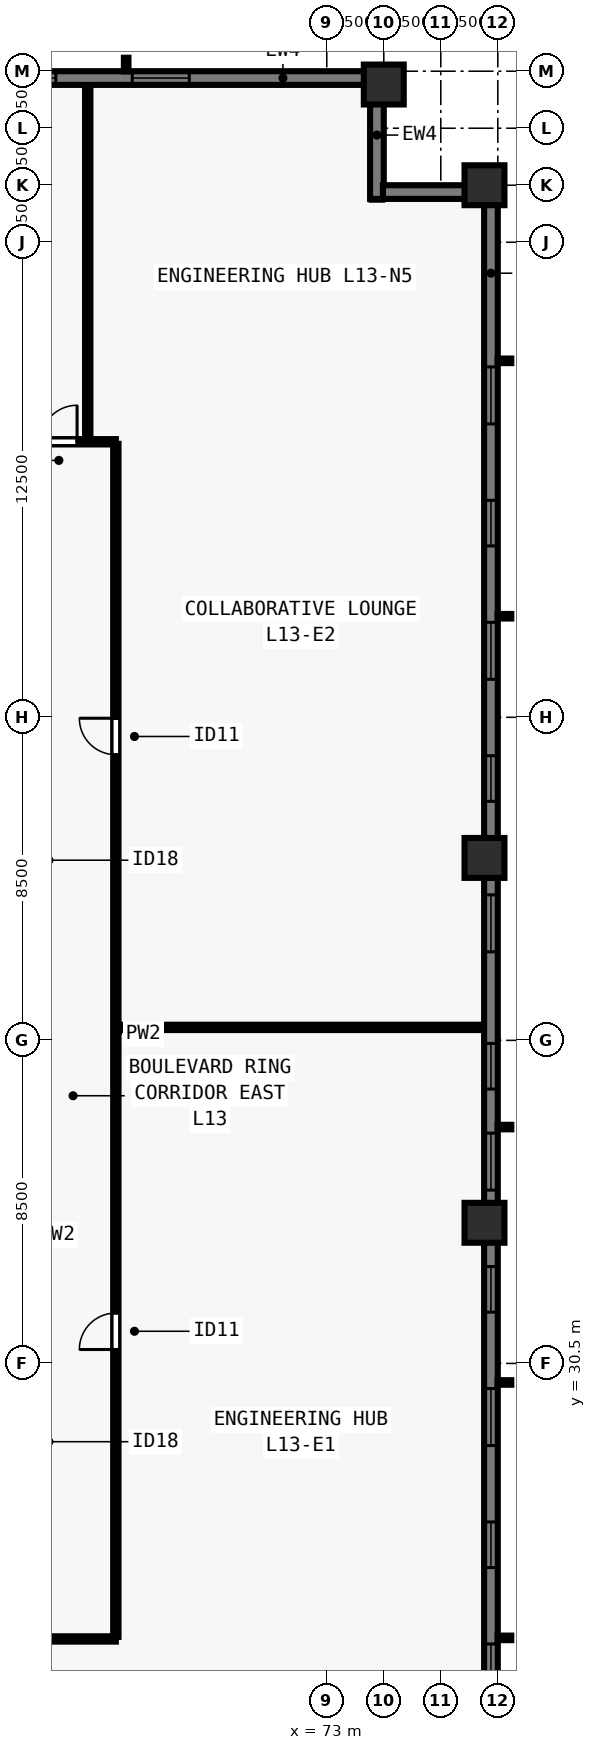
"""IFC4 building model, lengths in metres.
Left out: names, types, materials, properties, quantities, classifications, styles, units other than length and angle.
Written with IfcOpenShell. Run it as: python <this file> out.ifc"""

import sys

from ifc_helpers import new_model, si_unit, direction, frame, frame_2d, origin, origin_2d, place, context, subcontext, project, spatial, rectangle, extrude, element, fill, save


model = new_model("IFC4")
c1 = context("Model", 3, precision=1e-05, world=origin(), true_north=direction((0.0, 1.0)))
c2 = subcontext(c1, "Body", "Model", "MODEL_VIEW")
j1 = project(units=[si_unit("LENGTHUNIT", "METRE"), si_unit("PLANEANGLEUNIT", "RADIAN")], contexts=[c1])
p1 = place(None, origin())
s1 = spatial("IfcSite", under=j1, at=p1, CompositionType="ELEMENT")
p2 = place(p1, origin())
s2 = spatial("IfcBuilding", under=s1, at=p2, CompositionType="ELEMENT")
p3 = place(p2, frame((0.0, 0.0, 51.5)))
s3 = spatial("IfcBuildingStorey", under=s2, at=p3, CompositionType="ELEMENT", Elevation=51.5)
for number, where, z_axis, x_axis in (
    (1, (77.15, 34.2, 0.0), (0.0, 0.0, 1.0), (0.0, 1.0, 0.0)),
    (2, (77.15, 43.8, 0.0), (0.0, 0.0, 1.0), (0.0, 1.0, 0.0)),
    (3, (77.15, 61.5, 0.0), (0.0, 0.0, 1.0), (0.0, 1.0, 0.0)),
    (4, (74.5, 64.15, 0.0), (0.0, 0.0, 1.0), (1.0, 0.0, 0.0)),
):
    element("IfcColumn", number, at=place(p3, frame(where, z_axis=z_axis, x_axis=x_axis)), inside=s3, PredefinedType="COLUMN", context=c2, shape_type="SweptSolid", body=[
        extrude(rectangle(XDim=1.05, YDim=1.05, at=origin_2d()), origin(), (0.0, 0.0, 1.0), 3.5),
    ])
p4 = place(p3, frame((29.5, 64.32, 0.0), z_axis=(0.0, 0.0, 1.0), x_axis=(1.0, 0.0, 0.0)))
e5 = element("IfcWall", 5, at=p4, inside=s3, PredefinedType="SOLIDWALL", context=c2, shape_type="SweptSolid", body=[
    extrude(rectangle(XDim=44.662, YDim=0.36, at=frame_2d((22.331, 0.0))), origin(), (0.0, 0.0, 1.0), 3.28),
])
p5 = place(p4, frame((4.78, 0.0, 0.8)))
e6 = element("IfcOpeningElement", 6, at=p5, cuts=e5, PredefinedType="OPENING", context=c2, shape_type="SweptSolid", body=[
    extrude(rectangle(XDim=1.5, YDim=1.544, at=frame_2d((0.75, 0.772))), frame((0.0, 0.19, 0.0), z_axis=(0.0, -1.0, 0.0), x_axis=(1.0, 0.0, 0.0)), (0.0, 0.0, 1.0), 0.38),
])
p6 = place(p4, frame((8.29, 0.0, 0.8)))
e7 = element("IfcOpeningElement", 7, at=p6, cuts=e5, PredefinedType="OPENING", context=c2, shape_type="SweptSolid", body=[
    extrude(rectangle(XDim=1.2, YDim=1.544, at=frame_2d((0.6, 0.772))), frame((0.0, 0.19, 0.0), z_axis=(0.0, -1.0, 0.0), x_axis=(1.0, 0.0, 0.0)), (0.0, 0.0, 1.0), 0.38),
])
p7 = place(p4, frame((11.5, 0.0, 0.8)))
e8 = element("IfcOpeningElement", 8, at=p7, cuts=e5, PredefinedType="OPENING", context=c2, shape_type="SweptSolid", body=[
    extrude(rectangle(XDim=1.5, YDim=1.544, at=frame_2d((0.75, 0.772))), frame((0.0, 0.19, 0.0), z_axis=(0.0, -1.0, 0.0), x_axis=(1.0, 0.0, 0.0)), (0.0, 0.0, 1.0), 0.38),
])
p8 = place(p4, frame((15.01, 0.0, 0.8)))
e9 = element("IfcOpeningElement", 9, at=p8, cuts=e5, PredefinedType="OPENING", context=c2, shape_type="SweptSolid", body=[
    extrude(rectangle(XDim=1.2, YDim=1.544, at=frame_2d((0.6, 0.772))), frame((0.0, 0.19, 0.0), z_axis=(0.0, -1.0, 0.0), x_axis=(1.0, 0.0, 0.0)), (0.0, 0.0, 1.0), 0.38),
])
p9 = place(p4, frame((18.671, 0.0, 0.8)))
e10 = element("IfcOpeningElement", 10, at=p9, cuts=e5, PredefinedType="OPENING", context=c2, shape_type="SweptSolid", body=[
    extrude(rectangle(XDim=1.5, YDim=1.544, at=frame_2d((0.75, 0.772))), frame((0.0, 0.19, 0.0), z_axis=(0.0, -1.0, 0.0), x_axis=(1.0, 0.0, 0.0)), (0.0, 0.0, 1.0), 0.38),
])
p10 = place(p4, frame((21.731, 0.0, 0.8)))
e11 = element("IfcOpeningElement", 11, at=p10, cuts=e5, PredefinedType="OPENING", context=c2, shape_type="SweptSolid", body=[
    extrude(rectangle(XDim=1.2, YDim=1.544, at=frame_2d((0.6, 0.772))), frame((0.0, 0.19, 0.0), z_axis=(0.0, -1.0, 0.0), x_axis=(1.0, 0.0, 0.0)), (0.0, 0.0, 1.0), 0.38),
])
p11 = place(p4, frame((24.941, 0.0, 0.8)))
e12 = element("IfcOpeningElement", 12, at=p11, cuts=e5, PredefinedType="OPENING", context=c2, shape_type="SweptSolid", body=[
    extrude(rectangle(XDim=1.5, YDim=1.544, at=frame_2d((0.75, 0.772))), frame((0.0, 0.19, 0.0), z_axis=(0.0, -1.0, 0.0), x_axis=(1.0, 0.0, 0.0)), (0.0, 0.0, 1.0), 0.38),
])
p12 = place(p4, frame((28.451, 0.0, 0.8)))
e13 = element("IfcOpeningElement", 13, at=p12, cuts=e5, PredefinedType="OPENING", context=c2, shape_type="SweptSolid", body=[
    extrude(rectangle(XDim=1.2, YDim=1.544, at=frame_2d((0.6, 0.772))), frame((0.0, 0.19, 0.0), z_axis=(0.0, -1.0, 0.0), x_axis=(1.0, 0.0, 0.0)), (0.0, 0.0, 1.0), 0.38),
])
p13 = place(p4, frame((31.662, 0.0, 0.8)))
e14 = element("IfcOpeningElement", 14, at=p13, cuts=e5, PredefinedType="OPENING", context=c2, shape_type="SweptSolid", body=[
    extrude(rectangle(XDim=1.5, YDim=1.544, at=frame_2d((0.75, 0.772))), frame((0.0, 0.19, 0.0), z_axis=(0.0, -1.0, 0.0), x_axis=(1.0, 0.0, 0.0)), (0.0, 0.0, 1.0), 0.38),
])
p14 = place(p4, frame((35.172, 0.0, 0.8)))
e15 = element("IfcOpeningElement", 15, at=p14, cuts=e5, PredefinedType="OPENING", context=c2, shape_type="SweptSolid", body=[
    extrude(rectangle(XDim=1.2, YDim=1.544, at=frame_2d((0.6, 0.772))), frame((0.0, 0.19, 0.0), z_axis=(0.0, -1.0, 0.0), x_axis=(1.0, 0.0, 0.0)), (0.0, 0.0, 1.0), 0.38),
])
p15 = place(p4, frame((38.382, 0.0, 0.8)))
e16 = element("IfcOpeningElement", 16, at=p15, cuts=e5, PredefinedType="OPENING", context=c2, shape_type="SweptSolid", body=[
    extrude(rectangle(XDim=1.5, YDim=1.544, at=frame_2d((0.75, 0.772))), frame((0.0, 0.19, 0.0), z_axis=(0.0, -1.0, 0.0), x_axis=(1.0, 0.0, 0.0)), (0.0, 0.0, 1.0), 0.38),
])
p16 = place(p3, frame((74.32, 64.5, 0.0), z_axis=(0.0, 0.0, 1.0), x_axis=(0.0, -1.0, 0.0)))
e17 = element("IfcWall", 17, at=p16, inside=s3, PredefinedType="SOLIDWALL", context=c2, shape_type="SweptSolid", body=[
    extrude(rectangle(XDim=3.36, YDim=0.36, at=frame_2d((1.68, 0.0))), origin(), (0.0, 0.0, 1.0), 3.28),
])
p17 = place(p3, frame((74.478, 61.32, 0.0), z_axis=(0.0, 0.0, 1.0), x_axis=(1.0, 0.0, 0.0)))
e18 = element("IfcWall", 18, at=p17, inside=s3, PredefinedType="SOLIDWALL", context=c2, shape_type="SweptSolid", body=[
    extrude(rectangle(XDim=2.684, YDim=0.36, at=frame_2d((1.342, 0.0))), origin(), (0.0, 0.0, 1.0), 3.28),
])
p18 = place(p3, frame((77.32, 61.5, 0.0), z_axis=(0.0, 0.0, 1.0), x_axis=(0.0, -1.0, 0.0)))
e19 = element("IfcWall", 19, at=p18, inside=s3, PredefinedType="SOLIDWALL", context=c2, shape_type="SweptSolid", body=[
    extrude(rectangle(XDim=44.662, YDim=0.36, at=frame_2d((22.331, 0.0))), origin(), (0.0, 0.0, 1.0), 3.28),
])
p19 = place(p18, frame((4.78, 0.0, 0.8)))
e20 = element("IfcOpeningElement", 20, at=p19, cuts=e19, PredefinedType="OPENING", context=c2, shape_type="SweptSolid", body=[
    extrude(rectangle(XDim=1.5, YDim=1.544, at=frame_2d((0.75, 0.772))), frame((0.0, 0.19, 0.0), z_axis=(0.0, -1.0, 0.0), x_axis=(1.0, 0.0, 0.0)), (0.0, 0.0, 1.0), 0.38),
])
p20 = place(p18, frame((8.29, 0.0, 0.8)))
e21 = element("IfcOpeningElement", 21, at=p20, cuts=e19, PredefinedType="OPENING", context=c2, shape_type="SweptSolid", body=[
    extrude(rectangle(XDim=1.2, YDim=1.544, at=frame_2d((0.6, 0.772))), frame((0.0, 0.19, 0.0), z_axis=(0.0, -1.0, 0.0), x_axis=(1.0, 0.0, 0.0)), (0.0, 0.0, 1.0), 0.38),
])
p21 = place(p18, frame((11.5, 0.0, 0.8)))
e22 = element("IfcOpeningElement", 22, at=p21, cuts=e19, PredefinedType="OPENING", context=c2, shape_type="SweptSolid", body=[
    extrude(rectangle(XDim=1.5, YDim=1.544, at=frame_2d((0.75, 0.772))), frame((0.0, 0.19, 0.0), z_axis=(0.0, -1.0, 0.0), x_axis=(1.0, 0.0, 0.0)), (0.0, 0.0, 1.0), 0.38),
])
p22 = place(p18, frame((15.01, 0.0, 0.8)))
e23 = element("IfcOpeningElement", 23, at=p22, cuts=e19, PredefinedType="OPENING", context=c2, shape_type="SweptSolid", body=[
    extrude(rectangle(XDim=1.2, YDim=1.544, at=frame_2d((0.6, 0.772))), frame((0.0, 0.19, 0.0), z_axis=(0.0, -1.0, 0.0), x_axis=(1.0, 0.0, 0.0)), (0.0, 0.0, 1.0), 0.38),
])
p23 = place(p18, frame((18.671, 0.0, 0.8)))
e24 = element("IfcOpeningElement", 24, at=p23, cuts=e19, PredefinedType="OPENING", context=c2, shape_type="SweptSolid", body=[
    extrude(rectangle(XDim=1.5, YDim=1.544, at=frame_2d((0.75, 0.772))), frame((0.0, 0.19, 0.0), z_axis=(0.0, -1.0, 0.0), x_axis=(1.0, 0.0, 0.0)), (0.0, 0.0, 1.0), 0.38),
])
p24 = place(p18, frame((22.581, 0.0, 0.8)))
e25 = element("IfcOpeningElement", 25, at=p24, cuts=e19, PredefinedType="OPENING", context=c2, shape_type="SweptSolid", body=[
    extrude(rectangle(XDim=1.2, YDim=1.544, at=frame_2d((0.6, 0.772))), frame((0.0, 0.19, 0.0), z_axis=(0.0, -1.0, 0.0), x_axis=(1.0, 0.0, 0.0)), (0.0, 0.0, 1.0), 0.38),
])
p25 = place(p18, frame((24.941, 0.0, 0.8)))
e26 = element("IfcOpeningElement", 26, at=p25, cuts=e19, PredefinedType="OPENING", context=c2, shape_type="SweptSolid", body=[
    extrude(rectangle(XDim=1.5, YDim=1.544, at=frame_2d((0.75, 0.772))), frame((0.0, 0.19, 0.0), z_axis=(0.0, -1.0, 0.0), x_axis=(1.0, 0.0, 0.0)), (0.0, 0.0, 1.0), 0.38),
])
p26 = place(p18, frame((28.451, 0.0, 0.8)))
e27 = element("IfcOpeningElement", 27, at=p26, cuts=e19, PredefinedType="OPENING", context=c2, shape_type="SweptSolid", body=[
    extrude(rectangle(XDim=1.2, YDim=1.544, at=frame_2d((0.6, 0.772))), frame((0.0, 0.19, 0.0), z_axis=(0.0, -1.0, 0.0), x_axis=(1.0, 0.0, 0.0)), (0.0, 0.0, 1.0), 0.38),
])
p27 = place(p18, frame((31.662, 0.0, 0.8)))
e28 = element("IfcOpeningElement", 28, at=p27, cuts=e19, PredefinedType="OPENING", context=c2, shape_type="SweptSolid", body=[
    extrude(rectangle(XDim=1.5, YDim=1.544, at=frame_2d((0.75, 0.772))), frame((0.0, 0.19, 0.0), z_axis=(0.0, -1.0, 0.0), x_axis=(1.0, 0.0, 0.0)), (0.0, 0.0, 1.0), 0.38),
])
p28 = place(p18, frame((35.172, 0.0, 0.8)))
e29 = element("IfcOpeningElement", 29, at=p28, cuts=e19, PredefinedType="OPENING", context=c2, shape_type="SweptSolid", body=[
    extrude(rectangle(XDim=1.2, YDim=1.544, at=frame_2d((0.6, 0.772))), frame((0.0, 0.19, 0.0), z_axis=(0.0, -1.0, 0.0), x_axis=(1.0, 0.0, 0.0)), (0.0, 0.0, 1.0), 0.38),
])
p29 = place(p18, frame((38.382, 0.0, 0.8)))
e30 = element("IfcOpeningElement", 30, at=p29, cuts=e19, PredefinedType="OPENING", context=c2, shape_type="SweptSolid", body=[
    extrude(rectangle(XDim=1.5, YDim=1.544, at=frame_2d((0.75, 0.772))), frame((0.0, 0.19, 0.0), z_axis=(0.0, -1.0, 0.0), x_axis=(1.0, 0.0, 0.0)), (0.0, 0.0, 1.0), 0.38),
])
p30 = place(p3, frame((36.55, 23.25, 0.0), z_axis=(0.0, 0.0, 1.0), x_axis=(1.0, 0.0, 0.0)))
e31 = element("IfcWall", 31, at=p30, inside=s3, PredefinedType="PARTITIONING", context=c2, shape_type="SweptSolid", body=[
    extrude(rectangle(XDim=30.9, YDim=0.14, at=frame_2d((15.45, 0.0))), origin(), (0.0, 0.0, 1.0), 3.28),
])
p31 = place(p30, frame((2.386, 0.0, 0.0)))
e32 = element("IfcOpeningElement", 32, at=p31, cuts=e31, PredefinedType="OPENING", context=c2, shape_type="SweptSolid", body=[
    extrude(rectangle(XDim=0.96, YDim=2.12, at=frame_2d((0.48, 1.06))), frame((0.0, 0.08, 0.0), z_axis=(0.0, -1.0, 0.0), x_axis=(1.0, 0.0, 0.0)), (0.0, 0.0, 1.0), 0.16),
])
p32 = place(p30, frame((27.066, 0.0, 0.0)))
e33 = element("IfcOpeningElement", 33, at=p32, cuts=e31, PredefinedType="OPENING", context=c2, shape_type="SweptSolid", body=[
    extrude(rectangle(XDim=0.96, YDim=2.12, at=frame_2d((0.48, 1.06))), frame((0.0, 0.08, 0.0), z_axis=(0.0, -1.0, 0.0), x_axis=(1.0, 0.0, 0.0)), (0.0, 0.0, 1.0), 0.16),
])
p33 = place(p3, frame((36.55, 54.75, 0.0), z_axis=(0.0, 0.0, 1.0), x_axis=(1.0, 0.0, 0.0)))
e34 = element("IfcWall", 34, at=p33, inside=s3, PredefinedType="PARTITIONING", context=c2, shape_type="SweptSolid", body=[
    extrude(rectangle(XDim=30.9, YDim=0.14, at=frame_2d((15.45, 0.0))), origin(), (0.0, 0.0, 1.0), 3.28),
])
p34 = place(p33, frame((3.69, 0.0, 0.0)))
e35 = element("IfcOpeningElement", 35, at=p34, cuts=e34, PredefinedType="OPENING", context=c2, shape_type="SweptSolid", body=[
    extrude(rectangle(XDim=0.96, YDim=2.12, at=frame_2d((0.48, 1.06))), frame((0.0, 0.08, 0.0), z_axis=(0.0, -1.0, 0.0), x_axis=(1.0, 0.0, 0.0)), (0.0, 0.0, 1.0), 0.16),
])
p35 = place(p33, frame((5.013, 0.0, 0.0)))
e36 = element("IfcOpeningElement", 36, at=p35, cuts=e34, PredefinedType="OPENING", context=c2, shape_type="SweptSolid", body=[
    extrude(rectangle(XDim=0.96, YDim=2.12, at=frame_2d((0.48, 1.06))), frame((0.0, 0.08, 0.0), z_axis=(0.0, -1.0, 0.0), x_axis=(1.0, 0.0, 0.0)), (0.0, 0.0, 1.0), 0.16),
])
p36 = place(p33, frame((15.045, 0.0, 0.0)))
e37 = element("IfcOpeningElement", 37, at=p36, cuts=e34, PredefinedType="OPENING", context=c2, shape_type="SweptSolid", body=[
    extrude(rectangle(XDim=0.96, YDim=2.12, at=frame_2d((0.48, 1.06))), frame((0.0, 0.08, 0.0), z_axis=(0.0, -1.0, 0.0), x_axis=(1.0, 0.0, 0.0)), (0.0, 0.0, 1.0), 0.16),
])
p37 = place(p33, frame((25.077, 0.0, 0.0)))
e38 = element("IfcOpeningElement", 38, at=p37, cuts=e34, PredefinedType="OPENING", context=c2, shape_type="SweptSolid", body=[
    extrude(rectangle(XDim=0.96, YDim=2.12, at=frame_2d((0.48, 1.06))), frame((0.0, 0.08, 0.0), z_axis=(0.0, -1.0, 0.0), x_axis=(1.0, 0.0, 0.0)), (0.0, 0.0, 1.0), 0.16),
])
p38 = place(p33, frame((28.92, 0.0, 0.0)))
e39 = element("IfcOpeningElement", 39, at=p38, cuts=e34, PredefinedType="OPENING", context=c2, shape_type="SweptSolid", body=[
    extrude(rectangle(XDim=0.96, YDim=2.12, at=frame_2d((0.48, 1.06))), frame((0.0, 0.08, 0.0), z_axis=(0.0, -1.0, 0.0), x_axis=(1.0, 0.0, 0.0)), (0.0, 0.0, 1.0), 0.16),
])
p39 = place(p3, frame((67.45, 23.305, 0.0), z_axis=(0.0, 0.0, 1.0), x_axis=(0.0, 1.0, 0.0)))
e40 = element("IfcWall", 40, at=p39, inside=s3, PredefinedType="PARTITIONING", context=c2, shape_type="SweptSolid", body=[
    extrude(rectangle(XDim=31.39, YDim=0.14, at=frame_2d((15.695, 0.0))), origin(), (0.0, 0.0, 1.0), 3.28),
])
p40 = place(p39, frame((7.561, 0.0, 0.0)))
e41 = element("IfcOpeningElement", 41, at=p40, cuts=e40, PredefinedType="OPENING", context=c2, shape_type="SweptSolid", body=[
    extrude(rectangle(XDim=0.96, YDim=2.12, at=frame_2d((0.48, 1.06))), frame((0.0, 0.08, 0.0), z_axis=(0.0, -1.0, 0.0), x_axis=(1.0, 0.0, 0.0)), (0.0, 0.0, 1.0), 0.16),
])
p41 = place(p39, frame((23.211, 0.0, 0.0)))
e42 = element("IfcOpeningElement", 42, at=p41, cuts=e40, PredefinedType="OPENING", context=c2, shape_type="SweptSolid", body=[
    extrude(rectangle(XDim=0.96, YDim=2.12, at=frame_2d((0.48, 1.06))), frame((0.0, 0.08, 0.0), z_axis=(0.0, -1.0, 0.0), x_axis=(1.0, 0.0, 0.0)), (0.0, 0.0, 1.0), 0.16),
])
p42 = place(p3, frame((66.71, 54.85, 0.0), z_axis=(0.0, 0.0, 1.0), x_axis=(0.0, 1.0, 0.0)))
e43 = element("IfcWall", 43, at=p42, inside=s3, PredefinedType="PARTITIONING", context=c2, shape_type="SweptSolid", body=[
    extrude(rectangle(XDim=9.23, YDim=0.14, at=frame_2d((4.615, 0.0))), origin(), (0.0, 0.0, 1.0), 2.439),
])
p43 = place(p3, frame((67.55, 39.341, 0.0), z_axis=(0.0, 0.0, 1.0), x_axis=(1.0, 0.0, 0.0)))
e44 = element("IfcWall", 44, at=p43, inside=s3, PredefinedType="PARTITIONING", context=c2, shape_type="SweptSolid", body=[
    extrude(rectangle(XDim=9.53, YDim=0.14, at=frame_2d((4.765, 0.0))), origin(), (0.0, 0.0, 1.0), 3.28),
])
p44 = place(p14, origin())
e45 = element("IfcWindow", 45, at=p44, inside=s3, PartitioningType="SINGLE_PANEL", PredefinedType="WINDOW", context=c2, shape_type="SweptSolid", body=[
    extrude(rectangle(XDim=1.2, YDim=1.544, at=frame_2d((0.6, 0.772))), frame((0.0, -0.05, 0.0), z_axis=(0.0, -1.0, 0.0), x_axis=(1.0, 0.0, 0.0)), (0.0, 0.0, 1.0), 0.06),
])
fill(e15, e45)
p45 = place(p15, origin())
e46 = element("IfcWindow", 46, at=p45, inside=s3, PartitioningType="SINGLE_PANEL", PredefinedType="WINDOW", context=c2, shape_type="SweptSolid", body=[
    extrude(rectangle(XDim=1.5, YDim=1.544, at=frame_2d((0.75, 0.772))), frame((0.0, -0.05, 0.0), z_axis=(0.0, -1.0, 0.0), x_axis=(1.0, 0.0, 0.0)), (0.0, 0.0, 1.0), 0.06),
])
fill(e16, e46)
p46 = place(p19, origin())
e47 = element("IfcWindow", 47, at=p46, inside=s3, PartitioningType="SINGLE_PANEL", PredefinedType="WINDOW", context=c2, shape_type="SweptSolid", body=[
    extrude(rectangle(XDim=1.5, YDim=1.544, at=frame_2d((0.75, 0.772))), frame((0.0, -0.05, 0.0), z_axis=(0.0, -1.0, 0.0), x_axis=(1.0, 0.0, 0.0)), (0.0, 0.0, 1.0), 0.06),
])
fill(e20, e47)
p47 = place(p20, origin())
e48 = element("IfcWindow", 48, at=p47, inside=s3, PartitioningType="SINGLE_PANEL", PredefinedType="WINDOW", context=c2, shape_type="SweptSolid", body=[
    extrude(rectangle(XDim=1.2, YDim=1.544, at=frame_2d((0.6, 0.772))), frame((0.0, -0.05, 0.0), z_axis=(0.0, -1.0, 0.0), x_axis=(1.0, 0.0, 0.0)), (0.0, 0.0, 1.0), 0.06),
])
fill(e21, e48)
p48 = place(p21, origin())
e49 = element("IfcWindow", 49, at=p48, inside=s3, PartitioningType="SINGLE_PANEL", PredefinedType="WINDOW", context=c2, shape_type="SweptSolid", body=[
    extrude(rectangle(XDim=1.5, YDim=1.544, at=frame_2d((0.75, 0.772))), frame((0.0, -0.05, 0.0), z_axis=(0.0, -1.0, 0.0), x_axis=(1.0, 0.0, 0.0)), (0.0, 0.0, 1.0), 0.06),
])
fill(e22, e49)
p49 = place(p22, origin())
e50 = element("IfcWindow", 50, at=p49, inside=s3, PartitioningType="SINGLE_PANEL", PredefinedType="WINDOW", context=c2, shape_type="SweptSolid", body=[
    extrude(rectangle(XDim=1.2, YDim=1.544, at=frame_2d((0.6, 0.772))), frame((0.0, -0.05, 0.0), z_axis=(0.0, -1.0, 0.0), x_axis=(1.0, 0.0, 0.0)), (0.0, 0.0, 1.0), 0.06),
])
fill(e23, e50)
p50 = place(p23, origin())
e51 = element("IfcWindow", 51, at=p50, inside=s3, PartitioningType="SINGLE_PANEL", PredefinedType="WINDOW", context=c2, shape_type="SweptSolid", body=[
    extrude(rectangle(XDim=1.5, YDim=1.544, at=frame_2d((0.75, 0.772))), frame((0.0, -0.05, 0.0), z_axis=(0.0, -1.0, 0.0), x_axis=(1.0, 0.0, 0.0)), (0.0, 0.0, 1.0), 0.06),
])
fill(e24, e51)
p51 = place(p24, origin())
e52 = element("IfcWindow", 52, at=p51, inside=s3, PartitioningType="SINGLE_PANEL", PredefinedType="WINDOW", context=c2, shape_type="SweptSolid", body=[
    extrude(rectangle(XDim=1.2, YDim=1.544, at=frame_2d((0.6, 0.772))), frame((0.0, -0.05, 0.0), z_axis=(0.0, -1.0, 0.0), x_axis=(1.0, 0.0, 0.0)), (0.0, 0.0, 1.0), 0.06),
])
fill(e25, e52)
p52 = place(p25, origin())
e53 = element("IfcWindow", 53, at=p52, inside=s3, PartitioningType="SINGLE_PANEL", PredefinedType="WINDOW", context=c2, shape_type="SweptSolid", body=[
    extrude(rectangle(XDim=1.5, YDim=1.544, at=frame_2d((0.75, 0.772))), frame((0.0, -0.05, 0.0), z_axis=(0.0, -1.0, 0.0), x_axis=(1.0, 0.0, 0.0)), (0.0, 0.0, 1.0), 0.06),
])
fill(e26, e53)
p53 = place(p26, origin())
e54 = element("IfcWindow", 54, at=p53, inside=s3, PartitioningType="SINGLE_PANEL", PredefinedType="WINDOW", context=c2, shape_type="SweptSolid", body=[
    extrude(rectangle(XDim=1.2, YDim=1.544, at=frame_2d((0.6, 0.772))), frame((0.0, -0.05, 0.0), z_axis=(0.0, -1.0, 0.0), x_axis=(1.0, 0.0, 0.0)), (0.0, 0.0, 1.0), 0.06),
])
fill(e27, e54)
p54 = place(p27, origin())
e55 = element("IfcWindow", 55, at=p54, inside=s3, PartitioningType="SINGLE_PANEL", PredefinedType="WINDOW", context=c2, shape_type="SweptSolid", body=[
    extrude(rectangle(XDim=1.5, YDim=1.544, at=frame_2d((0.75, 0.772))), frame((0.0, -0.05, 0.0), z_axis=(0.0, -1.0, 0.0), x_axis=(1.0, 0.0, 0.0)), (0.0, 0.0, 1.0), 0.06),
])
fill(e28, e55)
p55 = place(p28, origin())
e56 = element("IfcWindow", 56, at=p55, inside=s3, PartitioningType="SINGLE_PANEL", PredefinedType="WINDOW", context=c2, shape_type="SweptSolid", body=[
    extrude(rectangle(XDim=1.2, YDim=1.544, at=frame_2d((0.6, 0.772))), frame((0.0, -0.05, 0.0), z_axis=(0.0, -1.0, 0.0), x_axis=(1.0, 0.0, 0.0)), (0.0, 0.0, 1.0), 0.06),
])
fill(e29, e56)
p56 = place(p29, origin())
e57 = element("IfcWindow", 57, at=p56, inside=s3, PartitioningType="SINGLE_PANEL", PredefinedType="WINDOW", context=c2, shape_type="SweptSolid", body=[
    extrude(rectangle(XDim=1.5, YDim=1.544, at=frame_2d((0.75, 0.772))), frame((0.0, -0.05, 0.0), z_axis=(0.0, -1.0, 0.0), x_axis=(1.0, 0.0, 0.0)), (0.0, 0.0, 1.0), 0.06),
])
fill(e30, e57)
p57 = place(p38, origin())
e58 = element("IfcDoor", 58, at=p57, inside=s3, OperationType="SINGLE_SWING_RIGHT", PredefinedType="DOOR", context=c2, shape_type="SweptSolid", body=[
    extrude(rectangle(XDim=0.96, YDim=2.12, at=frame_2d((0.48, 1.06))), frame((0.0, 0.025, 0.0), z_axis=(0.0, -1.0, 0.0), x_axis=(1.0, 0.0, 0.0)), (0.0, 0.0, 1.0), 0.05),
])
fill(e39, e58)
p58 = place(p40, origin())
e59 = element("IfcDoor", 59, at=p58, inside=s3, OperationType="SINGLE_SWING_LEFT", PredefinedType="DOOR", context=c2, shape_type="SweptSolid", body=[
    extrude(rectangle(XDim=0.96, YDim=2.12, at=frame_2d((0.48, 1.06))), frame((0.0, 0.025, 0.0), z_axis=(0.0, -1.0, 0.0), x_axis=(1.0, 0.0, 0.0)), (0.0, 0.0, 1.0), 0.05),
])
fill(e41, e59)
p59 = place(p41, origin())
e60 = element("IfcDoor", 60, at=p59, inside=s3, OperationType="SINGLE_SWING_RIGHT", PredefinedType="DOOR", context=c2, shape_type="SweptSolid", body=[
    extrude(rectangle(XDim=0.96, YDim=2.12, at=frame_2d((0.48, 1.06))), frame((0.0, 0.025, 0.0), z_axis=(0.0, -1.0, 0.0), x_axis=(1.0, 0.0, 0.0)), (0.0, 0.0, 1.0), 0.05),
])
fill(e42, e60)
save(model, sys.argv[1])
